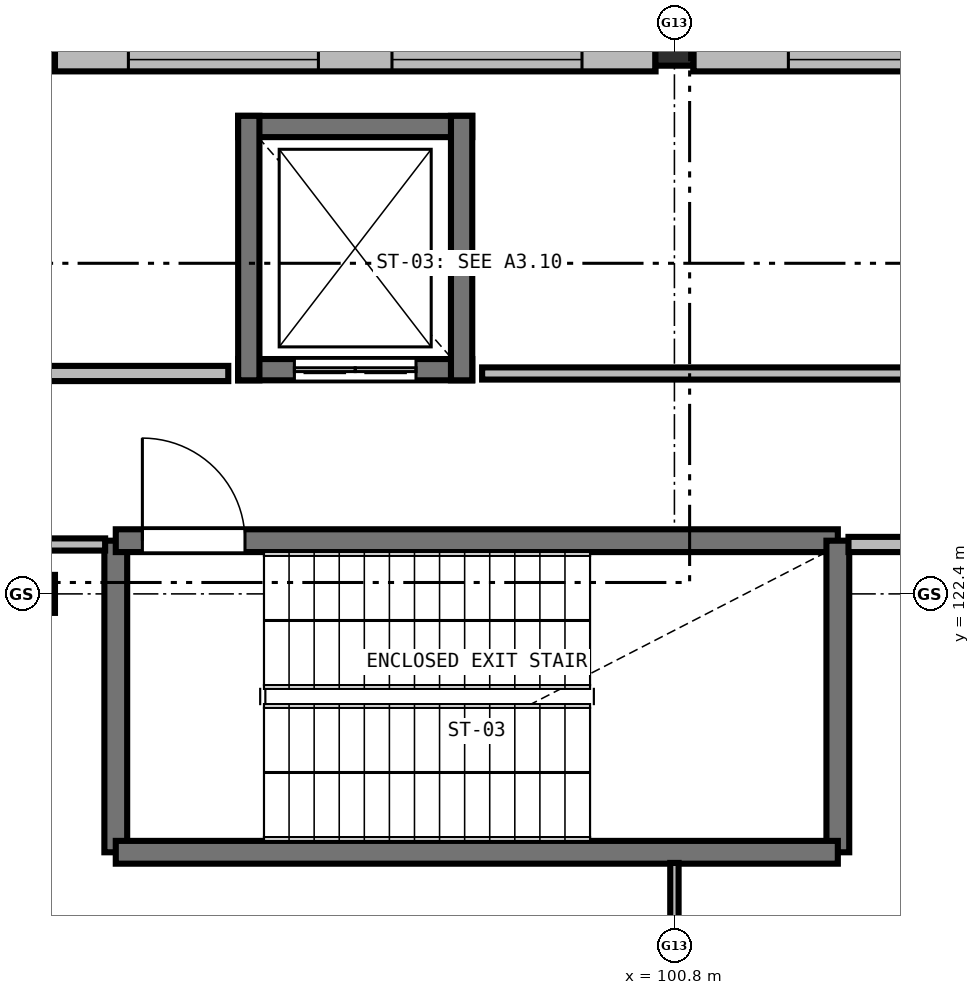
"""IFC4 building model, lengths in metres.
Left out: names, types, materials, properties, quantities, classifications, styles, units other than length and angle.
Written with IfcOpenShell. Run it as: python <this file> out.ifc"""

import sys

from ifc_helpers import new_model, si_unit, direction, frame, frame_2d, origin, origin_2d, place, context, subcontext, project, spatial, rectangle, extrude, element, fill, save


model = new_model("IFC4")
c1 = context("Model", 3, precision=1e-05, world=origin(), true_north=direction((0.0, 1.0)))
c2 = subcontext(c1, "Body", "Model", "MODEL_VIEW")
j1 = project(units=[si_unit("LENGTHUNIT", "METRE"), si_unit("PLANEANGLEUNIT", "RADIAN")], contexts=[c1])
p1 = place(None, origin())
s1 = spatial("IfcSite", under=j1, at=p1, CompositionType="ELEMENT")
p2 = place(p1, origin())
s2 = spatial("IfcBuilding", under=s1, at=p2, CompositionType="ELEMENT")
p3 = place(p2, frame((0.0, 0.0, 17.7)))
s3 = spatial("IfcBuildingStorey", under=s2, at=p3, CompositionType="ELEMENT", Elevation=17.7)
for number, where, z_axis, x_axis in (
    (1, (92.4, 122.4, 0.0), (0.0, 0.0, 1.0), (1.0, 0.0, 0.0)),
    (2, (92.4, 129.6, 0.0), (0.0, 0.0, 1.0), (1.0, 0.0, 0.0)),
    (3, (100.8, 129.6, 0.0), (0.0, 0.0, 1.0), (1.0, 0.0, 0.0)),
):
    element("IfcColumn", number, at=place(p3, frame(where, z_axis=z_axis, x_axis=x_axis)), inside=s3, PredefinedType="COLUMN", context=c2, shape_type="SweptSolid", body=[
        extrude(rectangle(XDim=0.5, YDim=0.5, at=origin_2d()), origin(), (0.0, 0.0, 1.0), 4.2),
    ])
p4 = place(p3, frame((92.648, 129.43, 0.0), z_axis=(0.0, 0.0, 1.0), x_axis=(1.0, 0.0, 0.0)))
e4 = element("IfcWall", 4, at=p4, inside=s3, PredefinedType="SOLIDWALL", context=c2, shape_type="SweptSolid", body=[
    extrude(rectangle(XDim=7.904, YDim=0.31, at=frame_2d((3.952, 0.0))), origin(), (0.0, 0.0, 1.0), 3.25),
])
p5 = place(p4, frame((0.968, 0.0, 0.95)))
e5 = element("IfcOpeningElement", 5, at=p5, cuts=e4, PredefinedType="OPENING", context=c2, shape_type="SweptSolid", body=[
    extrude(rectangle(XDim=2.5, YDim=2.05, at=frame_2d((1.25, 1.025))), frame((0.0, 0.165, 0.0), z_axis=(0.0, -1.0, 0.0), x_axis=(1.0, 0.0, 0.0)), (0.0, 0.0, 1.0), 0.33),
])
p6 = place(p4, frame((4.436, 0.0, 0.95)))
e6 = element("IfcOpeningElement", 6, at=p6, cuts=e4, PredefinedType="OPENING", context=c2, shape_type="SweptSolid", body=[
    extrude(rectangle(XDim=2.5, YDim=2.05, at=frame_2d((1.25, 1.025))), frame((0.0, 0.165, 0.0), z_axis=(0.0, -1.0, 0.0), x_axis=(1.0, 0.0, 0.0)), (0.0, 0.0, 1.0), 0.33),
])
p7 = place(p3, frame((101.048, 129.43, 0.0), z_axis=(0.0, 0.0, 1.0), x_axis=(1.0, 0.0, 0.0)))
e7 = element("IfcWall", 7, at=p7, inside=s3, PredefinedType="SOLIDWALL", context=c2, shape_type="SweptSolid", body=[
    extrude(rectangle(XDim=7.954, YDim=0.31, at=frame_2d((3.977, 0.0))), origin(), (0.0, 0.0, 1.0), 3.25),
])
p8 = place(p7, frame((1.251, 0.0, 0.95)))
e8 = element("IfcOpeningElement", 8, at=p8, cuts=e7, PredefinedType="OPENING", context=c2, shape_type="SweptSolid", body=[
    extrude(rectangle(XDim=2.1, YDim=1.85, at=frame_2d((1.05, 0.925))), frame((0.0, 0.165, 0.0), z_axis=(0.0, -1.0, 0.0), x_axis=(1.0, 0.0, 0.0)), (0.0, 0.0, 1.0), 0.33),
])
p9 = place(p7, frame((4.603, 0.0, 0.95)))
e9 = element("IfcOpeningElement", 9, at=p9, cuts=e7, PredefinedType="OPENING", context=c2, shape_type="SweptSolid", body=[
    extrude(rectangle(XDim=2.1, YDim=1.85, at=frame_2d((1.05, 0.925))), frame((0.0, 0.165, 0.0), z_axis=(0.0, -1.0, 0.0), x_axis=(1.0, 0.0, 0.0)), (0.0, 0.0, 1.0), 0.33),
])
p10 = place(p3, frame((93.45, 119.0, 0.0), z_axis=(0.0, 0.0, 1.0), x_axis=(0.0, 1.0, 0.0)))
e10 = element("IfcWall", 10, at=p10, inside=s3, PredefinedType="SHEAR", context=c2, shape_type="SweptSolid", body=[
    extrude(rectangle(XDim=4.1, YDim=0.3, at=frame_2d((2.05, 0.0))), origin(), (0.0, 0.0, 1.0), 3.88),
])
p11 = place(p3, frame((93.45, 123.1, 0.0), z_axis=(0.0, 0.0, 1.0), x_axis=(1.0, 0.0, 0.0)))
e11 = element("IfcWall", 11, at=p11, inside=s3, PredefinedType="SHEAR", context=c2, shape_type="SweptSolid", body=[
    extrude(rectangle(XDim=9.5, YDim=0.3, at=frame_2d((4.75, 0.0))), origin(), (0.0, 0.0, 1.0), 3.88),
])
p12 = place(p11, frame((0.35, 0.0, 0.0)))
e12 = element("IfcOpeningElement", 12, at=p12, cuts=e11, PredefinedType="OPENING", context=c2, shape_type="SweptSolid", body=[
    extrude(rectangle(XDim=1.35, YDim=2.2, at=frame_2d((0.675, 1.1))), frame((0.0, 0.16, 0.0), z_axis=(0.0, -1.0, 0.0), x_axis=(1.0, 0.0, 0.0)), (0.0, 0.0, 1.0), 0.32),
])
p13 = place(p3, frame((102.95, 123.1, 0.0), z_axis=(0.0, 0.0, 1.0), x_axis=(0.0, -1.0, 0.0)))
e13 = element("IfcWall", 13, at=p13, inside=s3, PredefinedType="SHEAR", context=c2, shape_type="SweptSolid", body=[
    extrude(rectangle(XDim=4.1, YDim=0.3, at=frame_2d((2.05, 0.0))), origin(), (0.0, 0.0, 1.0), 3.88),
])
p14 = place(p3, frame((102.95, 119.0, 0.0), z_axis=(0.0, 0.0, 1.0), x_axis=(-1.0, 0.0, 0.0)))
e14 = element("IfcWall", 14, at=p14, inside=s3, PredefinedType="SHEAR", context=c2, shape_type="SweptSolid", body=[
    extrude(rectangle(XDim=9.5, YDim=0.3, at=frame_2d((4.75, 0.0))), origin(), (0.0, 0.0, 1.0), 3.88),
])
p15 = place(p3, frame((98.14, 125.35, 0.0), z_axis=(0.0, 0.0, 1.0), x_axis=(-1.0, 0.0, 0.0)))
e15 = element("IfcWall", 15, at=p15, inside=s3, PredefinedType="SHEAR", context=c2, shape_type="SweptSolid", body=[
    extrude(rectangle(XDim=3.08, YDim=0.28, at=frame_2d((1.54, 0.0))), origin(), (0.0, 0.0, 1.0), 3.88),
])
p16 = place(p15, frame((0.74, 0.0, 0.0)))
e16 = element("IfcOpeningElement", 16, at=p16, cuts=e15, PredefinedType="OPENING", context=c2, shape_type="SweptSolid", body=[
    extrude(rectangle(XDim=1.6, YDim=2.2, at=frame_2d((0.8, 1.1))), frame((0.0, 0.15, 0.0), z_axis=(0.0, -1.0, 0.0), x_axis=(1.0, 0.0, 0.0)), (0.0, 0.0, 1.0), 0.3),
])
p17 = place(p3, frame((95.06, 128.55, 0.0), z_axis=(0.0, 0.0, 1.0), x_axis=(1.0, 0.0, 0.0)))
e17 = element("IfcWall", 17, at=p17, inside=s3, PredefinedType="SHEAR", context=c2, shape_type="SweptSolid", body=[
    extrude(rectangle(XDim=3.08, YDim=0.28, at=frame_2d((1.54, 0.0))), origin(), (0.0, 0.0, 1.0), 3.88),
])
for number, where, z_axis, x_axis in (
    (18, (95.2, 125.21, 0.0), (0.0, 0.0, 1.0), (0.0, 1.0, 0.0)),
    (19, (98.0, 128.69, 0.0), (0.0, 0.0, 1.0), (0.0, -1.0, 0.0)),
):
    element("IfcWall", number, at=place(p3, frame(where, z_axis=z_axis, x_axis=x_axis)), inside=s3, PredefinedType="SHEAR", context=c2, shape_type="SweptSolid", body=[
        extrude(rectangle(XDim=3.48, YDim=0.28, at=frame_2d((1.74, 0.0))), origin(), (0.0, 0.0, 1.0), 3.88),
    ])
p18 = place(p3, frame((75.6, 125.3, 0.0), z_axis=(0.0, 0.0, 1.0), x_axis=(1.0, 0.0, 0.0)))
e20 = element("IfcWall", 20, at=p18, inside=s3, PredefinedType="SOLIDWALL", context=c2, shape_type="SweptSolid", body=[
    extrude(rectangle(XDim=19.33, YDim=0.2, at=frame_2d((9.665, 0.0))), origin(), (0.0, 0.0, 1.0), 3.355),
])
p19 = place(p18, frame((3.625, 0.0, 0.0)))
e21 = element("IfcOpeningElement", 21, at=p19, cuts=e20, PredefinedType="OPENING", context=c2, shape_type="SweptSolid", body=[
    extrude(rectangle(XDim=1.15, YDim=2.15, at=frame_2d((0.575, 1.075))), frame((0.0, 0.11, 0.0), z_axis=(0.0, -1.0, 0.0), x_axis=(1.0, 0.0, 0.0)), (0.0, 0.0, 1.0), 0.22),
])
p20 = place(p3, frame((98.27, 125.3, 0.0), z_axis=(0.0, 0.0, 1.0), x_axis=(1.0, 0.0, 0.0)))
e22 = element("IfcWall", 22, at=p20, inside=s3, PredefinedType="PARTITIONING", context=c2, shape_type="SweptSolid", body=[
    extrude(rectangle(XDim=10.93, YDim=0.16, at=frame_2d((5.465, 0.0))), origin(), (0.0, 0.0, 1.0), 3.355),
])
p21 = place(p3, frame((93.31, 123.05, 0.0), z_axis=(0.0, 0.0, 1.0), x_axis=(-1.0, 0.0, 0.0)))
e23 = element("IfcWall", 23, at=p21, inside=s3, PredefinedType="PARTITIONING", context=c2, shape_type="SweptSolid", body=[
    extrude(rectangle(XDim=32.22, YDim=0.16, at=frame_2d((16.11, 0.0))), origin(), (0.0, 0.0, 1.0), 3.355),
])
p22 = place(p21, frame((27.435, 0.0, 0.0)))
e24 = element("IfcOpeningElement", 24, at=p22, cuts=e23, PredefinedType="OPENING", context=c2, shape_type="SweptSolid", body=[
    extrude(rectangle(XDim=1.55, YDim=2.2, at=frame_2d((0.775, 1.1))), frame((0.0, 0.09, 0.0), z_axis=(0.0, -1.0, 0.0), x_axis=(1.0, 0.0, 0.0)), (0.0, 0.0, 1.0), 0.18),
])
p23 = place(p3, frame((100.8, 115.52, 0.0), z_axis=(0.0, 0.0, 1.0), x_axis=(0.0, 1.0, 0.0)))
e25 = element("IfcWall", 25, at=p23, inside=s3, PredefinedType="PARTITIONING", context=c2, shape_type="SweptSolid", body=[
    extrude(rectangle(XDim=3.34, YDim=0.11, at=frame_2d((1.67, 0.0))), origin(), (0.0, 0.0, 1.0), 3.245),
])
p24 = place(p3, frame((134.18, 123.05, 0.0), z_axis=(0.0, 0.0, 1.0), x_axis=(-1.0, 0.0, 0.0)))
e26 = element("IfcWall", 26, at=p24, inside=s3, PredefinedType="SOLIDWALL", context=c2, shape_type="SweptSolid", body=[
    extrude(rectangle(XDim=31.09, YDim=0.2, at=frame_2d((15.545, 0.0))), origin(), (0.0, 0.0, 1.0), 3.355),
])
p25 = place(p24, frame((28.58, 0.0, 0.0)))
e27 = element("IfcOpeningElement", 27, at=p25, cuts=e26, PredefinedType="OPENING", context=c2, shape_type="SweptSolid", body=[
    extrude(rectangle(XDim=1.2, YDim=2.15, at=frame_2d((0.6, 1.075))), frame((0.0, 0.11, 0.0), z_axis=(0.0, -1.0, 0.0), x_axis=(1.0, 0.0, 0.0)), (0.0, 0.0, 1.0), 0.22),
])
p26 = place(p5, origin())
e28 = element("IfcWindow", 28, at=p26, inside=s3, PartitioningType="SINGLE_PANEL", PredefinedType="WINDOW", context=c2, shape_type="SweptSolid", body=[
    extrude(rectangle(XDim=2.5, YDim=2.05, at=frame_2d((1.25, 1.025))), frame((0.0, 0.03, 0.0), z_axis=(0.0, -1.0, 0.0), x_axis=(1.0, 0.0, 0.0)), (0.0, 0.0, 1.0), 0.06),
])
fill(e5, e28)
p27 = place(p6, origin())
e29 = element("IfcWindow", 29, at=p27, inside=s3, PartitioningType="SINGLE_PANEL", PredefinedType="WINDOW", context=c2, shape_type="SweptSolid", body=[
    extrude(rectangle(XDim=2.5, YDim=2.05, at=frame_2d((1.25, 1.025))), frame((0.0, 0.03, 0.0), z_axis=(0.0, -1.0, 0.0), x_axis=(1.0, 0.0, 0.0)), (0.0, 0.0, 1.0), 0.06),
])
fill(e6, e29)
p28 = place(p8, origin())
e30 = element("IfcWindow", 30, at=p28, inside=s3, PartitioningType="SINGLE_PANEL", PredefinedType="WINDOW", context=c2, shape_type="SweptSolid", body=[
    extrude(rectangle(XDim=2.1, YDim=1.85, at=frame_2d((1.05, 0.925))), frame((0.0, 0.03, 0.0), z_axis=(0.0, -1.0, 0.0), x_axis=(1.0, 0.0, 0.0)), (0.0, 0.0, 1.0), 0.06),
])
fill(e8, e30)
p29 = place(p12, origin())
e31 = element("IfcDoor", 31, at=p29, inside=s3, OperationType="SINGLE_SWING_LEFT", PredefinedType="DOOR", context=c2, shape_type="SweptSolid", body=[
    extrude(rectangle(XDim=1.35, YDim=2.2, at=frame_2d((0.675, 1.1))), frame((0.0, 0.025, 0.0), z_axis=(0.0, -1.0, 0.0), x_axis=(1.0, 0.0, 0.0)), (0.0, 0.0, 1.0), 0.05),
])
fill(e12, e31)
p30 = place(p16, origin())
e32 = element("IfcDoor", 32, at=p30, inside=s3, OperationType="DOUBLE_DOOR_SLIDING", PredefinedType="DOOR", context=c2, shape_type="SweptSolid", body=[
    extrude(rectangle(XDim=1.6, YDim=2.2, at=frame_2d((0.8, 1.1))), frame((0.0, 0.025, 0.0), z_axis=(0.0, -1.0, 0.0), x_axis=(1.0, 0.0, 0.0)), (0.0, 0.0, 1.0), 0.05),
])
fill(e16, e32)
save(model, sys.argv[1])
